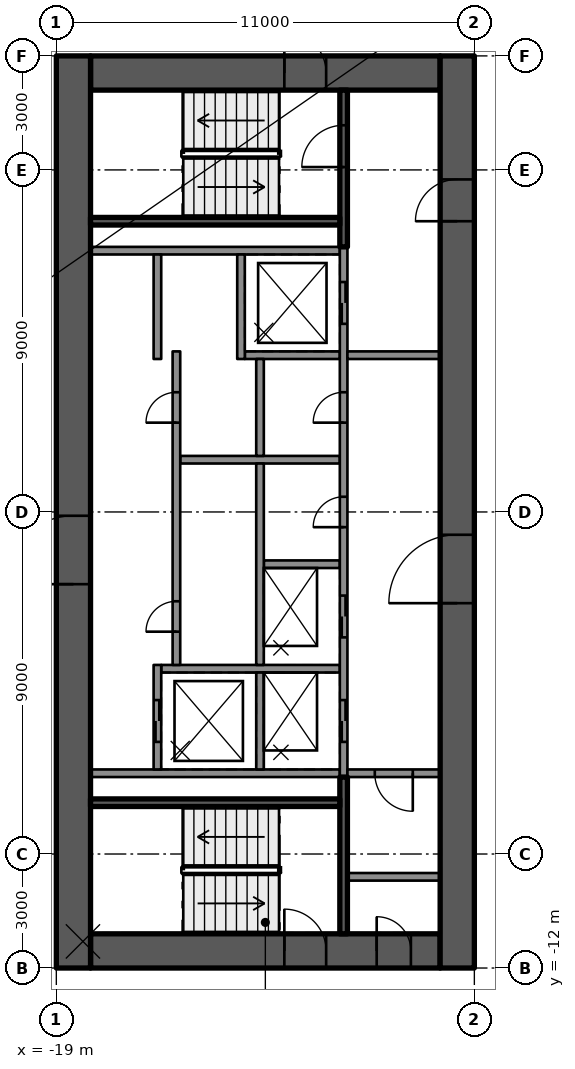
"""IFC4 building model, lengths in metres.
Left out: names, types, materials, properties, quantities, classifications, styles, units other than length and angle.
Written with IfcOpenShell. Run it as: python <this file> out.ifc"""

import sys

from ifc_helpers import new_model, si_unit, direction, frame, frame_2d, origin, place, context, subcontext, project, spatial, rectangle, extrude, element, fill, save


model = new_model("IFC4")
c1 = context("Model", 3, precision=1e-05, world=origin(), true_north=direction((0.0, 1.0)))
c2 = subcontext(c1, "Body", "Model", "MODEL_VIEW")
j1 = project(units=[si_unit("LENGTHUNIT", "METRE"), si_unit("PLANEANGLEUNIT", "RADIAN")], contexts=[c1])
p1 = place(None, origin())
s1 = spatial("IfcSite", under=j1, at=p1, CompositionType="ELEMENT")
p2 = place(p1, origin())
s2 = spatial("IfcBuilding", under=s1, at=p2, CompositionType="ELEMENT")
p3 = place(p2, frame((0.0, 0.0, 285.9)))
s3 = spatial("IfcBuildingStorey", under=s2, at=p3, CompositionType="ELEMENT", Elevation=285.9)
p4 = place(p3, frame((-18.1, 11.55, 0.0), z_axis=(0.0, 0.0, 1.0), x_axis=(1.0, 0.0, 0.0)))
e1 = element("IfcWall", 1, at=p4, inside=s3, PredefinedType="SHEAR", context=c2, shape_type="SweptSolid", body=[
    extrude(rectangle(XDim=9.2, YDim=0.9, at=frame_2d((4.6, 0.0))), origin(), (0.0, 0.0, 1.0), 3.5),
])
p5 = place(p4, frame((5.1, 0.0, 0.0)))
e2 = element("IfcOpeningElement", 2, at=p5, cuts=e1, PredefinedType="OPENING", context=c2, shape_type="SweptSolid", body=[
    extrude(rectangle(XDim=1.1, YDim=2.1, at=frame_2d((0.55, 1.05))), frame((0.0, 0.46, 0.0), z_axis=(0.0, -1.0, 0.0), x_axis=(1.0, 0.0, 0.0)), (0.0, 0.0, 1.0), 0.92),
])
p6 = place(p3, frame((-18.1, -11.55, 0.0), z_axis=(0.0, 0.0, 1.0), x_axis=(1.0, 0.0, 0.0)))
e3 = element("IfcWall", 3, at=p6, inside=s3, PredefinedType="SHEAR", context=c2, shape_type="SweptSolid", body=[
    extrude(rectangle(XDim=9.2, YDim=0.9, at=frame_2d((4.6, 0.0))), origin(), (0.0, 0.0, 1.0), 3.5),
])
p7 = place(p6, frame((5.1, 0.0, 0.0)))
e4 = element("IfcOpeningElement", 4, at=p7, cuts=e3, PredefinedType="OPENING", context=c2, shape_type="SweptSolid", body=[
    extrude(rectangle(XDim=1.1, YDim=2.1, at=frame_2d((0.55, 1.05))), frame((0.0, 0.46, 0.0), z_axis=(0.0, -1.0, 0.0), x_axis=(1.0, 0.0, 0.0)), (0.0, 0.0, 1.0), 0.92),
])
p8 = place(p6, frame((7.53, 0.0, 0.0)))
e5 = element("IfcOpeningElement", 5, at=p8, cuts=e3, PredefinedType="OPENING", context=c2, shape_type="SweptSolid", body=[
    extrude(rectangle(XDim=0.9, YDim=2.1, at=frame_2d((0.45, 1.05))), frame((0.0, 0.46, 0.0), z_axis=(0.0, -1.0, 0.0), x_axis=(1.0, 0.0, 0.0)), (0.0, 0.0, 1.0), 0.92),
])
p9 = place(p3, frame((-18.55, -12.0, 0.0), z_axis=(0.0, 0.0, 1.0), x_axis=(0.0, 1.0, 0.0)))
e6 = element("IfcWall", 6, at=p9, inside=s3, PredefinedType="SHEAR", context=c2, shape_type="SweptSolid", body=[
    extrude(rectangle(XDim=24.0, YDim=0.9, at=frame_2d((12.0, 0.0))), origin(), (0.0, 0.0, 1.0), 3.5),
])
p10 = place(p9, frame((10.1, 0.0, 0.0)))
e7 = element("IfcOpeningElement", 7, at=p10, cuts=e6, PredefinedType="OPENING", context=c2, shape_type="SweptSolid", body=[
    extrude(rectangle(XDim=1.8, YDim=2.1, at=frame_2d((0.9, 1.05))), frame((0.0, 0.46, 0.0), z_axis=(0.0, -1.0, 0.0), x_axis=(1.0, 0.0, 0.0)), (0.0, 0.0, 1.0), 0.92),
])
p11 = place(p3, frame((-8.45, -12.0, 0.0), z_axis=(0.0, 0.0, 1.0), x_axis=(0.0, 1.0, 0.0)))
e8 = element("IfcWall", 8, at=p11, inside=s3, PredefinedType="SHEAR", context=c2, shape_type="SweptSolid", body=[
    extrude(rectangle(XDim=24.0, YDim=0.9, at=frame_2d((12.0, 0.0))), origin(), (0.0, 0.0, 1.0), 3.5),
])
p12 = place(p11, frame((9.6, 0.0, 0.0)))
e9 = element("IfcOpeningElement", 9, at=p12, cuts=e8, PredefinedType="OPENING", context=c2, shape_type="SweptSolid", body=[
    extrude(rectangle(XDim=1.8, YDim=2.1, at=frame_2d((0.9, 1.05))), frame((0.0, 0.46, 0.0), z_axis=(0.0, -1.0, 0.0), x_axis=(1.0, 0.0, 0.0)), (0.0, 0.0, 1.0), 0.92),
])
p13 = place(p11, frame((19.65, 0.0, 0.0)))
e10 = element("IfcOpeningElement", 10, at=p13, cuts=e8, PredefinedType="OPENING", context=c2, shape_type="SweptSolid", body=[
    extrude(rectangle(XDim=1.1, YDim=2.1, at=frame_2d((0.55, 1.05))), frame((0.0, 0.46, 0.0), z_axis=(0.0, -1.0, 0.0), x_axis=(1.0, 0.0, 0.0)), (0.0, 0.0, 1.0), 0.92),
])
for number, where, z_axis, x_axis in (
    (11, (-11.54, 6.875, 0.0), (0.0, 0.0, 1.0), (-1.0, 0.0, 0.0)),
    (12, (-11.54, -6.875, 0.0), (0.0, 0.0, 1.0), (-1.0, 0.0, 0.0)),
):
    element("IfcWall", number, at=place(p3, frame(where, z_axis=z_axis, x_axis=x_axis)), inside=s3, PredefinedType="SOLIDWALL", context=c2, shape_type="SweptSolid", body=[
        extrude(rectangle(XDim=6.56, YDim=0.2, at=frame_2d((3.28, 0.0))), origin(), (0.0, 0.0, 1.0), 3.09),
    ])
p14 = place(p3, frame((-11.54, -4.125, 0.0), z_axis=(0.0, 0.0, 1.0), x_axis=(-1.0, 0.0, 0.0)))
e13 = element("IfcWall", 13, at=p14, inside=s3, PredefinedType="SOLIDWALL", context=c2, shape_type="SweptSolid", body=[
    extrude(rectangle(XDim=4.7, YDim=0.2, at=frame_2d((2.35, 0.0))), origin(), (0.0, 0.0, 1.0), 3.09),
])
p15 = place(p3, frame((-11.54, -1.375, 0.0), z_axis=(0.0, 0.0, 1.0), x_axis=(-1.0, 0.0, 0.0)))
e14 = element("IfcWall", 14, at=p15, inside=s3, PredefinedType="SOLIDWALL", context=c2, shape_type="SweptSolid", body=[
    extrude(rectangle(XDim=2.0, YDim=0.2, at=frame_2d((1.0, 0.0))), origin(), (0.0, 0.0, 1.0), 3.09),
])
p16 = place(p3, frame((-11.54, 1.375, 0.0), z_axis=(0.0, 0.0, 1.0), x_axis=(-1.0, 0.0, 0.0)))
e15 = element("IfcWall", 15, at=p16, inside=s3, PredefinedType="SOLIDWALL", context=c2, shape_type="SweptSolid", body=[
    extrude(rectangle(XDim=4.2, YDim=0.2, at=frame_2d((2.1, 0.0))), origin(), (0.0, 0.0, 1.0), 3.09),
])
p17 = place(p3, frame((-11.54, 4.125, 0.0), z_axis=(0.0, 0.0, 1.0), x_axis=(-1.0, 0.0, 0.0)))
e16 = element("IfcWall", 16, at=p17, inside=s3, PredefinedType="SOLIDWALL", context=c2, shape_type="SweptSolid", body=[
    extrude(rectangle(XDim=2.5, YDim=0.2, at=frame_2d((1.25, 0.0))), origin(), (0.0, 0.0, 1.0), 3.09),
])
p18 = place(p3, frame((-11.44, -6.975, 0.0), z_axis=(0.0, 0.0, 1.0), x_axis=(0.0, 1.0, 0.0)))
e17 = element("IfcWall", 17, at=p18, inside=s3, PredefinedType="SOLIDWALL", context=c2, shape_type="SweptSolid", body=[
    extrude(rectangle(XDim=13.95, YDim=0.2, at=frame_2d((6.975, 0.0))), origin(), (0.0, 0.0, 1.0), 3.09),
])
p19 = place(p18, frame((0.925, 0.0, 0.0)))
e18 = element("IfcOpeningElement", 18, at=p19, cuts=e17, PredefinedType="OPENING", context=c2, shape_type="SweptSolid", body=[
    extrude(rectangle(XDim=1.1, YDim=2.1, at=frame_2d((0.55, 1.05))), frame((0.0, 0.11, 0.0), z_axis=(0.0, -1.0, 0.0), x_axis=(1.0, 0.0, 0.0)), (0.0, 0.0, 1.0), 0.22),
])
p20 = place(p18, frame((3.675, 0.0, 0.0)))
e19 = element("IfcOpeningElement", 19, at=p20, cuts=e17, PredefinedType="OPENING", context=c2, shape_type="SweptSolid", body=[
    extrude(rectangle(XDim=1.1, YDim=2.1, at=frame_2d((0.55, 1.05))), frame((0.0, 0.11, 0.0), z_axis=(0.0, -1.0, 0.0), x_axis=(1.0, 0.0, 0.0)), (0.0, 0.0, 1.0), 0.22),
])
p21 = place(p18, frame((11.925, 0.0, 0.0)))
e20 = element("IfcOpeningElement", 20, at=p21, cuts=e17, PredefinedType="OPENING", context=c2, shape_type="SweptSolid", body=[
    extrude(rectangle(XDim=1.1, YDim=2.1, at=frame_2d((0.55, 1.05))), frame((0.0, 0.11, 0.0), z_axis=(0.0, -1.0, 0.0), x_axis=(1.0, 0.0, 0.0)), (0.0, 0.0, 1.0), 0.22),
])
p22 = place(p18, frame((6.575, 0.0, 0.0)))
e21 = element("IfcOpeningElement", 21, at=p22, cuts=e17, PredefinedType="OPENING", context=c2, shape_type="SweptSolid", body=[
    extrude(rectangle(XDim=0.8, YDim=2.1, at=frame_2d((0.4, 1.05))), frame((0.0, 0.11, 0.0), z_axis=(0.0, -1.0, 0.0), x_axis=(1.0, 0.0, 0.0)), (0.0, 0.0, 1.0), 0.22),
])
p23 = place(p18, frame((9.325, 0.0, 0.0)))
e22 = element("IfcOpeningElement", 22, at=p23, cuts=e17, PredefinedType="OPENING", context=c2, shape_type="SweptSolid", body=[
    extrude(rectangle(XDim=0.8, YDim=2.1, at=frame_2d((0.4, 1.05))), frame((0.0, 0.11, 0.0), z_axis=(0.0, -1.0, 0.0), x_axis=(1.0, 0.0, 0.0)), (0.0, 0.0, 1.0), 0.22),
])
p24 = place(p3, frame((-13.64, -6.775, 0.0), z_axis=(0.0, 0.0, 1.0), x_axis=(0.0, 1.0, 0.0)))
e23 = element("IfcWall", 23, at=p24, inside=s3, PredefinedType="SOLIDWALL", context=c2, shape_type="SweptSolid", body=[
    extrude(rectangle(XDim=2.55, YDim=0.2, at=frame_2d((1.275, 0.0))), origin(), (0.0, 0.0, 1.0), 3.09),
])
p25 = place(p3, frame((-13.64, -4.025, 0.0), z_axis=(0.0, 0.0, 1.0), x_axis=(0.0, 1.0, 0.0)))
e24 = element("IfcWall", 24, at=p25, inside=s3, PredefinedType="SOLIDWALL", context=c2, shape_type="SweptSolid", body=[
    extrude(rectangle(XDim=5.3, YDim=0.2, at=frame_2d((2.65, 0.0))), origin(), (0.0, 0.0, 1.0), 3.09),
])
p26 = place(p3, frame((-13.64, 1.475, 0.0), z_axis=(0.0, 0.0, 1.0), x_axis=(0.0, 1.0, 0.0)))
e25 = element("IfcWall", 25, at=p26, inside=s3, PredefinedType="SOLIDWALL", context=c2, shape_type="SweptSolid", body=[
    extrude(rectangle(XDim=2.55, YDim=0.2, at=frame_2d((1.275, 0.0))), origin(), (0.0, 0.0, 1.0), 3.09),
])
p27 = place(p3, frame((-14.14, 4.025, 0.0), z_axis=(0.0, 0.0, 1.0), x_axis=(0.0, 1.0, 0.0)))
e26 = element("IfcWall", 26, at=p27, inside=s3, PredefinedType="SOLIDWALL", context=c2, shape_type="SweptSolid", body=[
    extrude(rectangle(XDim=2.75, YDim=0.2, at=frame_2d((1.375, 0.0))), origin(), (0.0, 0.0, 1.0), 3.09),
])
p28 = place(p3, frame((-16.34, -6.775, 0.0), z_axis=(0.0, 0.0, 1.0), x_axis=(0.0, 1.0, 0.0)))
e27 = element("IfcWall", 27, at=p28, inside=s3, PredefinedType="SOLIDWALL", context=c2, shape_type="SweptSolid", body=[
    extrude(rectangle(XDim=2.75, YDim=0.2, at=frame_2d((1.375, 0.0))), origin(), (0.0, 0.0, 1.0), 3.09),
])
p29 = place(p28, frame((0.725, 0.0, 0.0)))
e28 = element("IfcOpeningElement", 28, at=p29, cuts=e27, PredefinedType="OPENING", context=c2, shape_type="SweptSolid", body=[
    extrude(rectangle(XDim=1.1, YDim=2.1, at=frame_2d((0.55, 1.05))), frame((0.0, 0.11, 0.0), z_axis=(0.0, -1.0, 0.0), x_axis=(1.0, 0.0, 0.0)), (0.0, 0.0, 1.0), 0.22),
])
p30 = place(p3, frame((-15.84, -4.025, 0.0), z_axis=(0.0, 0.0, 1.0), x_axis=(0.0, 1.0, 0.0)))
e29 = element("IfcWall", 29, at=p30, inside=s3, PredefinedType="SOLIDWALL", context=c2, shape_type="SweptSolid", body=[
    extrude(rectangle(XDim=8.25, YDim=0.2, at=frame_2d((4.125, 0.0))), origin(), (0.0, 0.0, 1.0), 3.09),
])
p31 = place(p30, frame((0.875, 0.0, 0.0)))
e30 = element("IfcOpeningElement", 30, at=p31, cuts=e29, PredefinedType="OPENING", context=c2, shape_type="SweptSolid", body=[
    extrude(rectangle(XDim=0.8, YDim=2.1, at=frame_2d((0.4, 1.05))), frame((0.0, 0.11, 0.0), z_axis=(0.0, -1.0, 0.0), x_axis=(1.0, 0.0, 0.0)), (0.0, 0.0, 1.0), 0.22),
])
p32 = place(p30, frame((6.375, 0.0, 0.0)))
e31 = element("IfcOpeningElement", 31, at=p32, cuts=e29, PredefinedType="OPENING", context=c2, shape_type="SweptSolid", body=[
    extrude(rectangle(XDim=0.8, YDim=2.1, at=frame_2d((0.4, 1.05))), frame((0.0, 0.11, 0.0), z_axis=(0.0, -1.0, 0.0), x_axis=(1.0, 0.0, 0.0)), (0.0, 0.0, 1.0), 0.22),
])
p33 = place(p3, frame((-16.34, 4.025, 0.0), z_axis=(0.0, 0.0, 1.0), x_axis=(0.0, 1.0, 0.0)))
e32 = element("IfcWall", 32, at=p33, inside=s3, PredefinedType="SOLIDWALL", context=c2, shape_type="SweptSolid", body=[
    extrude(rectangle(XDim=2.75, YDim=0.2, at=frame_2d((1.375, 0.0))), origin(), (0.0, 0.0, 1.0), 3.09),
])
p34 = place(p3, frame((-11.44, 6.975, 0.0), z_axis=(0.0, 0.0, 1.0), x_axis=(0.0, 1.0, 0.0)))
e33 = element("IfcWall", 33, at=p34, inside=s3, PredefinedType="SOLIDWALL", context=c2, shape_type="SweptSolid", body=[
    extrude(rectangle(XDim=4.125, YDim=0.2, at=frame_2d((2.062, 0.0))), origin(), (0.0, 0.0, 1.0), 3.09),
])
p35 = place(p34, frame((2.1, 0.0, 0.0)))
e34 = element("IfcOpeningElement", 34, at=p35, cuts=e33, PredefinedType="OPENING", context=c2, shape_type="SweptSolid", body=[
    extrude(rectangle(XDim=1.1, YDim=2.1, at=frame_2d((0.55, 1.05))), frame((0.0, 0.11, 0.0), z_axis=(0.0, -1.0, 0.0), x_axis=(1.0, 0.0, 0.0)), (0.0, 0.0, 1.0), 0.22),
])
p36 = place(p3, frame((-11.54, 7.65, 0.0), z_axis=(0.0, 0.0, 1.0), x_axis=(-1.0, 0.0, 0.0)))
e35 = element("IfcWall", 35, at=p36, inside=s3, PredefinedType="SOLIDWALL", context=c2, shape_type="SweptSolid", body=[
    extrude(rectangle(XDim=6.56, YDim=0.2, at=frame_2d((3.28, 0.0))), origin(), (0.0, 0.0, 1.0), 3.09),
])
p37 = place(p3, frame((-11.44, -11.1, 0.0), z_axis=(0.0, 0.0, 1.0), x_axis=(0.0, 1.0, 0.0)))
e36 = element("IfcWall", 36, at=p37, inside=s3, PredefinedType="SOLIDWALL", context=c2, shape_type="SweptSolid", body=[
    extrude(rectangle(XDim=4.125, YDim=0.2, at=frame_2d((2.062, 0.0))), origin(), (0.0, 0.0, 1.0), 3.09),
])
p38 = place(p3, frame((-11.54, -7.65, 0.0), z_axis=(0.0, 0.0, 1.0), x_axis=(-1.0, 0.0, 0.0)))
e37 = element("IfcWall", 37, at=p38, inside=s3, PredefinedType="SOLIDWALL", context=c2, shape_type="SweptSolid", body=[
    extrude(rectangle(XDim=6.56, YDim=0.2, at=frame_2d((3.28, 0.0))), origin(), (0.0, 0.0, 1.0), 3.09),
])
p39 = place(p3, frame((-8.9, 4.125, 0.0), z_axis=(0.0, 0.0, 1.0), x_axis=(-1.0, 0.0, 0.0)))
e38 = element("IfcWall", 38, at=p39, inside=s3, PredefinedType="PARTITIONING", context=c2, shape_type="SweptSolid", body=[
    extrude(rectangle(XDim=2.44, YDim=0.2, at=frame_2d((1.22, 0.0))), origin(), (0.0, 0.0, 1.0), 3.09),
])
p40 = place(p3, frame((-8.9, -6.875, 0.0), z_axis=(0.0, 0.0, 1.0), x_axis=(-1.0, 0.0, 0.0)))
e39 = element("IfcWall", 39, at=p40, inside=s3, PredefinedType="PARTITIONING", context=c2, shape_type="SweptSolid", body=[
    extrude(rectangle(XDim=2.44, YDim=0.2, at=frame_2d((1.22, 0.0))), origin(), (0.0, 0.0, 1.0), 3.09),
])
p41 = place(p40, frame((0.72, 0.0, 0.0)))
e40 = element("IfcOpeningElement", 40, at=p41, cuts=e39, PredefinedType="OPENING", context=c2, shape_type="SweptSolid", body=[
    extrude(rectangle(XDim=1.0, YDim=2.1, at=frame_2d((0.5, 1.05))), frame((0.0, 0.11, 0.0), z_axis=(0.0, -1.0, 0.0), x_axis=(1.0, 0.0, 0.0)), (0.0, 0.0, 1.0), 0.22),
])
p42 = place(p3, frame((-8.9, -9.6, 0.0), z_axis=(0.0, 0.0, 1.0), x_axis=(-1.0, 0.0, 0.0)))
e41 = element("IfcWall", 41, at=p42, inside=s3, PredefinedType="PARTITIONING", context=c2, shape_type="SweptSolid", body=[
    extrude(rectangle(XDim=2.44, YDim=0.2, at=frame_2d((1.22, 0.0))), origin(), (0.0, 0.0, 1.0), 3.09),
])
p43 = place(p19, origin())
e42 = element("IfcDoor", 42, at=p43, inside=s3, OperationType="DOUBLE_DOOR_SLIDING", PredefinedType="DOOR", context=c2, shape_type="SweptSolid", body=[
    extrude(rectangle(XDim=1.1, YDim=2.1, at=frame_2d((0.55, 1.05))), frame((0.0, 0.025, 0.0), z_axis=(0.0, -1.0, 0.0), x_axis=(1.0, 0.0, 0.0)), (0.0, 0.0, 1.0), 0.05),
])
fill(e18, e42)
p44 = place(p29, origin())
e43 = element("IfcDoor", 43, at=p44, inside=s3, OperationType="DOUBLE_DOOR_SLIDING", PredefinedType="DOOR", context=c2, shape_type="SweptSolid", body=[
    extrude(rectangle(XDim=1.1, YDim=2.1, at=frame_2d((0.55, 1.05))), frame((0.0, 0.025, 0.0), z_axis=(0.0, -1.0, 0.0), x_axis=(1.0, 0.0, 0.0)), (0.0, 0.0, 1.0), 0.05),
])
fill(e28, e43)
p45 = place(p20, origin())
e44 = element("IfcDoor", 44, at=p45, inside=s3, OperationType="DOUBLE_DOOR_SLIDING", PredefinedType="DOOR", context=c2, shape_type="SweptSolid", body=[
    extrude(rectangle(XDim=1.1, YDim=2.1, at=frame_2d((0.55, 1.05))), frame((0.0, 0.025, 0.0), z_axis=(0.0, -1.0, 0.0), x_axis=(1.0, 0.0, 0.0)), (0.0, 0.0, 1.0), 0.05),
])
fill(e19, e44)
p46 = place(p21, origin())
e45 = element("IfcDoor", 45, at=p46, inside=s3, OperationType="DOUBLE_DOOR_SLIDING", PredefinedType="DOOR", context=c2, shape_type="SweptSolid", body=[
    extrude(rectangle(XDim=1.1, YDim=2.1, at=frame_2d((0.55, 1.05))), frame((0.0, 0.025, 0.0), z_axis=(0.0, -1.0, 0.0), x_axis=(1.0, 0.0, 0.0)), (0.0, 0.0, 1.0), 0.05),
])
fill(e20, e45)
p47 = place(p31, origin())
e46 = element("IfcDoor", 46, at=p47, inside=s3, OperationType="SINGLE_SWING_LEFT", PredefinedType="DOOR", context=c2, shape_type="SweptSolid", body=[
    extrude(rectangle(XDim=0.8, YDim=2.1, at=frame_2d((0.4, 1.05))), frame((0.0, 0.025, 0.0), z_axis=(0.0, -1.0, 0.0), x_axis=(1.0, 0.0, 0.0)), (0.0, 0.0, 1.0), 0.05),
])
fill(e30, e46)
p48 = place(p22, origin())
e47 = element("IfcDoor", 47, at=p48, inside=s3, OperationType="SINGLE_SWING_LEFT", PredefinedType="DOOR", context=c2, shape_type="SweptSolid", body=[
    extrude(rectangle(XDim=0.8, YDim=2.1, at=frame_2d((0.4, 1.05))), frame((0.0, 0.025, 0.0), z_axis=(0.0, -1.0, 0.0), x_axis=(1.0, 0.0, 0.0)), (0.0, 0.0, 1.0), 0.05),
])
fill(e21, e47)
p49 = place(p23, origin())
e48 = element("IfcDoor", 48, at=p49, inside=s3, OperationType="SINGLE_SWING_LEFT", PredefinedType="DOOR", context=c2, shape_type="SweptSolid", body=[
    extrude(rectangle(XDim=0.8, YDim=2.1, at=frame_2d((0.4, 1.05))), frame((0.0, 0.025, 0.0), z_axis=(0.0, -1.0, 0.0), x_axis=(1.0, 0.0, 0.0)), (0.0, 0.0, 1.0), 0.05),
])
fill(e22, e48)
p50 = place(p32, origin())
e49 = element("IfcDoor", 49, at=p50, inside=s3, OperationType="SINGLE_SWING_LEFT", PredefinedType="DOOR", context=c2, shape_type="SweptSolid", body=[
    extrude(rectangle(XDim=0.8, YDim=2.1, at=frame_2d((0.4, 1.05))), frame((0.0, 0.025, 0.0), z_axis=(0.0, -1.0, 0.0), x_axis=(1.0, 0.0, 0.0)), (0.0, 0.0, 1.0), 0.05),
])
fill(e31, e49)
p51 = place(p12, origin())
e50 = element("IfcDoor", 50, at=p51, inside=s3, OperationType="SINGLE_SWING_LEFT", PredefinedType="DOOR", context=c2, shape_type="SweptSolid", body=[
    extrude(rectangle(XDim=1.8, YDim=2.1, at=frame_2d((0.9, 1.05))), frame((0.0, 0.025, 0.0), z_axis=(0.0, -1.0, 0.0), x_axis=(1.0, 0.0, 0.0)), (0.0, 0.0, 1.0), 0.05),
])
fill(e9, e50)
p52 = place(p10, origin())
e51 = element("IfcDoor", 51, at=p52, inside=s3, OperationType="SINGLE_SWING_LEFT", PredefinedType="DOOR", context=c2, shape_type="SweptSolid", body=[
    extrude(rectangle(XDim=1.8, YDim=2.1, at=frame_2d((0.9, 1.05))), frame((0.0, 0.025, 0.0), z_axis=(0.0, -1.0, 0.0), x_axis=(1.0, 0.0, 0.0)), (0.0, 0.0, 1.0), 0.05),
])
fill(e7, e51)
p53 = place(p13, origin())
e52 = element("IfcDoor", 52, at=p53, inside=s3, OperationType="SINGLE_SWING_RIGHT", PredefinedType="DOOR", context=c2, shape_type="SweptSolid", body=[
    extrude(rectangle(XDim=1.1, YDim=2.1, at=frame_2d((0.55, 1.05))), frame((0.0, 0.025, 0.0), z_axis=(0.0, -1.0, 0.0), x_axis=(1.0, 0.0, 0.0)), (0.0, 0.0, 1.0), 0.05),
])
fill(e10, e52)
p54 = place(p5, origin())
e53 = element("IfcDoor", 53, at=p54, inside=s3, OperationType="SINGLE_SWING_RIGHT", PredefinedType="DOOR", context=c2, shape_type="SweptSolid", body=[
    extrude(rectangle(XDim=1.1, YDim=2.1, at=frame_2d((0.55, 1.05))), frame((0.0, 0.025, 0.0), z_axis=(0.0, -1.0, 0.0), x_axis=(1.0, 0.0, 0.0)), (0.0, 0.0, 1.0), 0.05),
])
fill(e2, e53)
p55 = place(p7, origin())
e54 = element("IfcDoor", 54, at=p55, inside=s3, OperationType="SINGLE_SWING_RIGHT", PredefinedType="DOOR", context=c2, shape_type="SweptSolid", body=[
    extrude(rectangle(XDim=1.1, YDim=2.1, at=frame_2d((0.55, 1.05))), frame((0.0, 0.025, 0.0), z_axis=(0.0, -1.0, 0.0), x_axis=(1.0, 0.0, 0.0)), (0.0, 0.0, 1.0), 0.05),
])
fill(e4, e54)
p56 = place(p35, origin())
e55 = element("IfcDoor", 55, at=p56, inside=s3, OperationType="SINGLE_SWING_RIGHT", PredefinedType="DOOR", context=c2, shape_type="SweptSolid", body=[
    extrude(rectangle(XDim=1.1, YDim=2.1, at=frame_2d((0.55, 1.05))), frame((0.0, 0.025, 0.0), z_axis=(0.0, -1.0, 0.0), x_axis=(1.0, 0.0, 0.0)), (0.0, 0.0, 1.0), 0.05),
])
fill(e34, e55)
p57 = place(p8, origin())
e56 = element("IfcDoor", 56, at=p57, inside=s3, OperationType="SINGLE_SWING_RIGHT", PredefinedType="DOOR", context=c2, shape_type="SweptSolid", body=[
    extrude(rectangle(XDim=0.9, YDim=2.1, at=frame_2d((0.45, 1.05))), frame((0.0, 0.025, 0.0), z_axis=(0.0, -1.0, 0.0), x_axis=(1.0, 0.0, 0.0)), (0.0, 0.0, 1.0), 0.05),
])
fill(e5, e56)
p58 = place(p41, origin())
e57 = element("IfcDoor", 57, at=p58, inside=s3, OperationType="SINGLE_SWING_RIGHT", PredefinedType="DOOR", context=c2, shape_type="SweptSolid", body=[
    extrude(rectangle(XDim=1.0, YDim=2.1, at=frame_2d((0.5, 1.05))), frame((0.0, 0.025, 0.0), z_axis=(0.0, -1.0, 0.0), x_axis=(1.0, 0.0, 0.0)), (0.0, 0.0, 1.0), 0.05),
])
fill(e40, e57)
save(model, sys.argv[1])
